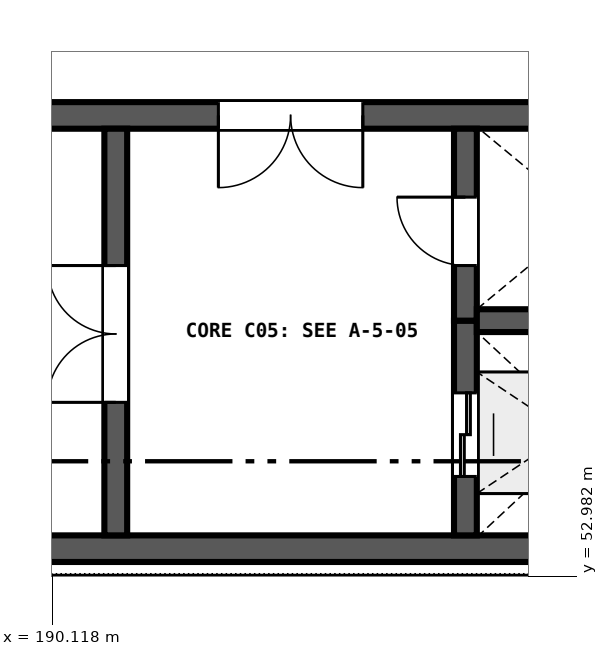
"""IFC4 building model, lengths in metres.
Left out: names, types, materials, properties, quantities, classifications, styles, units other than length and angle.
Written with IfcOpenShell. Run it as: python <this file> out.ifc"""

import sys

from ifc_helpers import new_model, si_unit, direction, frame, frame_2d, origin, place, context, subcontext, project, spatial, rectangle, extrude, element, fill, save


model = new_model("IFC4")
c1 = context("Model", 3, precision=1e-05, world=origin(), true_north=direction((0.0, 1.0)))
c2 = subcontext(c1, "Body", "Model", "MODEL_VIEW")
j1 = project(units=[si_unit("LENGTHUNIT", "METRE"), si_unit("PLANEANGLEUNIT", "RADIAN")], contexts=[c1])
p1 = place(None, origin())
s1 = spatial("IfcSite", under=j1, at=p1, CompositionType="ELEMENT")
p2 = place(p1, origin())
s2 = spatial("IfcBuilding", under=s1, at=p2, CompositionType="ELEMENT")
p3 = place(p2, frame((0.0, 0.0, 4.8)))
s3 = spatial("IfcBuildingStorey", under=s2, at=p3, CompositionType="ELEMENT", Elevation=4.8)
p4 = place(p3, frame((180.9, 53.35, 0.0), z_axis=(0.0, 0.0, 1.0), x_axis=(1.0, 0.0, 0.0)))
e1 = element("IfcWall", 1, at=p4, inside=s3, PredefinedType="SHEAR", context=c2, shape_type="SweptSolid", body=[
    extrude(rectangle(XDim=18.0, YDim=0.35, at=frame_2d((9.0, 0.0))), origin(), (0.0, 0.0, 1.0), 4.52),
])
p5 = place(p3, frame((198.9, 59.05, 0.0), z_axis=(0.0, 0.0, 1.0), x_axis=(-1.0, 0.0, 0.0)))
e2 = element("IfcWall", 2, at=p5, inside=s3, PredefinedType="SHEAR", context=c2, shape_type="SweptSolid", body=[
    extrude(rectangle(XDim=18.0, YDim=0.35, at=frame_2d((9.0, 0.0))), origin(), (0.0, 0.0, 1.0), 4.52),
])
p6 = place(p5, frame((4.7, 0.0, 0.0)))
e3 = element("IfcOpeningElement", 3, at=p6, cuts=e2, PredefinedType="OPENING", context=c2, shape_type="SweptSolid", body=[
    extrude(rectangle(XDim=1.9, YDim=2.25, at=frame_2d((0.95, 1.125))), frame((0.0, 0.185, 0.0), z_axis=(0.0, -1.0, 0.0), x_axis=(1.0, 0.0, 0.0)), (0.0, 0.0, 1.0), 0.37),
])
p7 = place(p3, frame((190.95, 53.525, 0.0), z_axis=(0.0, 0.0, 1.0), x_axis=(0.0, 1.0, 0.0)))
e4 = element("IfcWall", 4, at=p7, inside=s3, PredefinedType="SHEAR", context=c2, shape_type="SweptSolid", body=[
    extrude(rectangle(XDim=5.35, YDim=0.3, at=frame_2d((2.675, 0.0))), origin(), (0.0, 0.0, 1.0), 4.52),
])
p8 = place(p7, frame((1.75, 0.0, 0.0)))
e5 = element("IfcOpeningElement", 5, at=p8, cuts=e4, PredefinedType="OPENING", context=c2, shape_type="SweptSolid", body=[
    extrude(rectangle(XDim=1.8, YDim=2.25, at=frame_2d((0.9, 1.125))), frame((0.0, 0.16, 0.0), z_axis=(0.0, -1.0, 0.0), x_axis=(1.0, 0.0, 0.0)), (0.0, 0.0, 1.0), 0.32),
])
p9 = place(p3, frame((195.55, 53.525, 0.0), z_axis=(0.0, 0.0, 1.0), x_axis=(0.0, 1.0, 0.0)))
e6 = element("IfcWall", 6, at=p9, inside=s3, PredefinedType="SHEAR", context=c2, shape_type="SweptSolid", body=[
    extrude(rectangle(XDim=2.825, YDim=0.3, at=frame_2d((1.413, 0.0))), origin(), (0.0, 0.0, 1.0), 4.52),
])
p10 = place(p9, frame((0.775, 0.0, 0.0)))
e7 = element("IfcOpeningElement", 7, at=p10, cuts=e6, PredefinedType="OPENING", context=c2, shape_type="SweptSolid", body=[
    extrude(rectangle(XDim=1.1, YDim=2.1, at=frame_2d((0.55, 1.05))), frame((0.0, 0.16, 0.0), z_axis=(0.0, -1.0, 0.0), x_axis=(1.0, 0.0, 0.0)), (0.0, 0.0, 1.0), 0.32),
])
p11 = place(p3, frame((195.55, 56.35, 0.0), z_axis=(0.0, 0.0, 1.0), x_axis=(0.0, 1.0, 0.0)))
e8 = element("IfcWall", 8, at=p11, inside=s3, PredefinedType="SHEAR", context=c2, shape_type="SweptSolid", body=[
    extrude(rectangle(XDim=2.525, YDim=0.3, at=frame_2d((1.262, 0.0))), origin(), (0.0, 0.0, 1.0), 4.52),
])
p12 = place(p11, frame((0.725, 0.0, 0.0)))
e9 = element("IfcOpeningElement", 9, at=p12, cuts=e8, PredefinedType="OPENING", context=c2, shape_type="SweptSolid", body=[
    extrude(rectangle(XDim=0.9, YDim=2.1, at=frame_2d((0.45, 1.05))), frame((0.0, 0.16, 0.0), z_axis=(0.0, -1.0, 0.0), x_axis=(1.0, 0.0, 0.0)), (0.0, 0.0, 1.0), 0.32),
])
p13 = place(p3, frame((195.7, 56.35, 0.0), z_axis=(0.0, 0.0, 1.0), x_axis=(1.0, 0.0, 0.0)))
e10 = element("IfcWall", 10, at=p13, inside=s3, PredefinedType="SHEAR", context=c2, shape_type="SweptSolid", body=[
    extrude(rectangle(XDim=2.875, YDim=0.3, at=frame_2d((1.438, 0.0))), origin(), (0.0, 0.0, 1.0), 4.52),
])
p14 = place(p8, origin())
e11 = element("IfcDoor", 11, at=p14, inside=s3, OperationType="DOUBLE_DOOR_SINGLE_SWING", PredefinedType="DOOR", context=c2, shape_type="SweptSolid", body=[
    extrude(rectangle(XDim=1.8, YDim=2.25, at=frame_2d((0.9, 1.125))), frame((0.0, 0.025, 0.0), z_axis=(0.0, -1.0, 0.0), x_axis=(1.0, 0.0, 0.0)), (0.0, 0.0, 1.0), 0.05),
])
fill(e5, e11)
p15 = place(p12, origin())
e12 = element("IfcDoor", 12, at=p15, inside=s3, OperationType="SINGLE_SWING_RIGHT", PredefinedType="DOOR", context=c2, shape_type="SweptSolid", body=[
    extrude(rectangle(XDim=0.9, YDim=2.1, at=frame_2d((0.45, 1.05))), frame((0.0, 0.025, 0.0), z_axis=(0.0, -1.0, 0.0), x_axis=(1.0, 0.0, 0.0)), (0.0, 0.0, 1.0), 0.05),
])
fill(e9, e12)
p16 = place(p10, origin())
e13 = element("IfcDoor", 13, at=p16, inside=s3, OperationType="DOUBLE_DOOR_SLIDING", PredefinedType="DOOR", context=c2, shape_type="SweptSolid", body=[
    extrude(rectangle(XDim=1.1, YDim=2.1, at=frame_2d((0.55, 1.05))), frame((0.0, 0.025, 0.0), z_axis=(0.0, -1.0, 0.0), x_axis=(1.0, 0.0, 0.0)), (0.0, 0.0, 1.0), 0.05),
])
fill(e7, e13)
p17 = place(p6, origin())
e14 = element("IfcDoor", 14, at=p17, inside=s3, OperationType="DOUBLE_DOOR_SINGLE_SWING", PredefinedType="DOOR", context=c2, shape_type="SweptSolid", body=[
    extrude(rectangle(XDim=1.9, YDim=2.25, at=frame_2d((0.95, 1.125))), frame((0.0, 0.025, 0.0), z_axis=(0.0, -1.0, 0.0), x_axis=(1.0, 0.0, 0.0)), (0.0, 0.0, 1.0), 0.05),
])
fill(e3, e14)
save(model, sys.argv[1])
